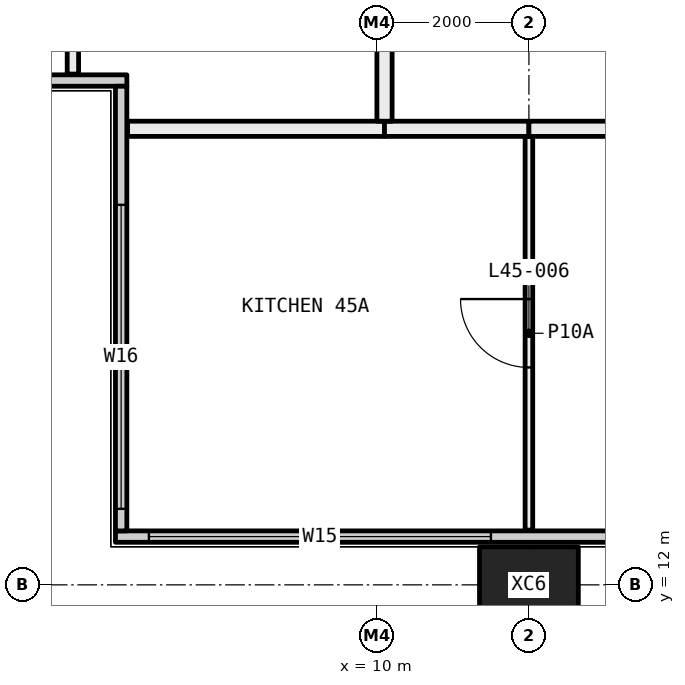
"""IFC4 building model, lengths in metres.
Left out: names, types, materials, properties, quantities, classifications, styles, units other than length and angle.
Written with IfcOpenShell. Run it as: python <this file> out.ifc"""

import sys

from ifc_helpers import new_model, si_unit, direction, frame, frame_2d, origin, origin_2d, place, context, subcontext, project, spatial, rectangle, hollow_rectangle, extrude, element, fill, save


model = new_model("IFC4")
c1 = context("Model", 3, precision=1e-05, world=origin(), true_north=direction((0.0, 1.0)))
c2 = subcontext(c1, "Body", "Model", "MODEL_VIEW")
j1 = project(units=[si_unit("LENGTHUNIT", "METRE"), si_unit("PLANEANGLEUNIT", "RADIAN")], contexts=[c1])
p1 = place(None, origin())
s1 = spatial("IfcSite", under=j1, at=p1, CompositionType="ELEMENT")
p2 = place(p1, origin())
s2 = spatial("IfcBuilding", under=s1, at=p2, CompositionType="ELEMENT")
p3 = place(p2, frame((0.0, 0.0, 172.05)))
s3 = spatial("IfcBuildingStorey", under=s2, at=p3, CompositionType="ELEMENT", Elevation=172.05)
p4 = place(p3, frame((12.0, 12.0, -0.4), z_axis=(0.0, 0.0, 1.0), x_axis=(1.0, 0.0, 0.0)))
e1 = element("IfcColumn", 1, at=p4, inside=s3, PredefinedType="COLUMN", context=c2, shape_type="SweptSolid", body=[
    extrude(hollow_rectangle(XDim=1.3, YDim=1.0, WallThickness=0.05, at=origin_2d()), origin(), (0.0, 0.0, 1.0), 3.45),
])
p5 = place(p3, frame((6.56, 12.635, 0.0), z_axis=(0.0, 0.0, 1.0), x_axis=(1.0, 0.0, 0.0)))
e2 = element("IfcWall", 2, at=p5, inside=s3, PredefinedType="ELEMENTEDWALL", context=c2, shape_type="SweptSolid", body=[
    extrude(rectangle(XDim=46.88, YDim=0.15, at=frame_2d((23.44, 0.0))), origin(), (0.0, 0.0, 1.0), 3.05),
])
p6 = place(p5, frame((0.44, 0.0, 0.45)))
e3 = element("IfcOpeningElement", 3, at=p6, cuts=e2, PredefinedType="OPENING", context=c2, shape_type="SweptSolid", body=[
    extrude(rectangle(XDim=4.5, YDim=2.55, at=frame_2d((2.25, 1.275))), frame((0.0, 0.085, 0.0), z_axis=(0.0, -1.0, 0.0), x_axis=(1.0, 0.0, 0.0)), (0.0, 0.0, 1.0), 0.17),
])
p7 = place(p5, frame((7.69, 0.0, 0.45)))
e4 = element("IfcOpeningElement", 4, at=p7, cuts=e2, PredefinedType="OPENING", context=c2, shape_type="SweptSolid", body=[
    extrude(rectangle(XDim=3.25, YDim=2.55, at=frame_2d((1.625, 1.275))), frame((0.0, 0.085, 0.0), z_axis=(0.0, -1.0, 0.0), x_axis=(1.0, 0.0, 0.0)), (0.0, 0.0, 1.0), 0.17),
])
p8 = place(p5, frame((11.94, 0.0, 0.45)))
e5 = element("IfcOpeningElement", 5, at=p8, cuts=e2, PredefinedType="OPENING", context=c2, shape_type="SweptSolid", body=[
    extrude(rectangle(XDim=3.25, YDim=2.55, at=frame_2d((1.625, 1.275))), frame((0.0, 0.085, 0.0), z_axis=(0.0, -1.0, 0.0), x_axis=(1.0, 0.0, 0.0)), (0.0, 0.0, 1.0), 0.17),
])
p9 = place(p5, frame((19.69, 0.0, 0.45)))
e6 = element("IfcOpeningElement", 6, at=p9, cuts=e2, PredefinedType="OPENING", context=c2, shape_type="SweptSolid", body=[
    extrude(rectangle(XDim=3.25, YDim=2.55, at=frame_2d((1.625, 1.275))), frame((0.0, 0.085, 0.0), z_axis=(0.0, -1.0, 0.0), x_axis=(1.0, 0.0, 0.0)), (0.0, 0.0, 1.0), 0.17),
])
p10 = place(p5, frame((23.94, 0.0, 0.45)))
e7 = element("IfcOpeningElement", 7, at=p10, cuts=e2, PredefinedType="OPENING", context=c2, shape_type="SweptSolid", body=[
    extrude(rectangle(XDim=2.0, YDim=2.55, at=frame_2d((1.0, 1.275))), frame((0.0, 0.085, 0.0), z_axis=(0.0, -1.0, 0.0), x_axis=(1.0, 0.0, 0.0)), (0.0, 0.0, 1.0), 0.17),
])
p11 = place(p5, frame((31.69, 0.0, 0.45)))
e8 = element("IfcOpeningElement", 8, at=p11, cuts=e2, PredefinedType="OPENING", context=c2, shape_type="SweptSolid", body=[
    extrude(rectangle(XDim=3.25, YDim=2.55, at=frame_2d((1.625, 1.275))), frame((0.0, 0.085, 0.0), z_axis=(0.0, -1.0, 0.0), x_axis=(1.0, 0.0, 0.0)), (0.0, 0.0, 1.0), 0.17),
])
p12 = place(p5, frame((35.94, 0.0, 0.45)))
e9 = element("IfcOpeningElement", 9, at=p12, cuts=e2, PredefinedType="OPENING", context=c2, shape_type="SweptSolid", body=[
    extrude(rectangle(XDim=3.25, YDim=2.55, at=frame_2d((1.625, 1.275))), frame((0.0, 0.085, 0.0), z_axis=(0.0, -1.0, 0.0), x_axis=(1.0, 0.0, 0.0)), (0.0, 0.0, 1.0), 0.17),
])
p13 = place(p5, frame((41.94, 0.0, 0.45)))
e10 = element("IfcOpeningElement", 10, at=p13, cuts=e2, PredefinedType="OPENING", context=c2, shape_type="SweptSolid", body=[
    extrude(rectangle(XDim=4.5, YDim=2.55, at=frame_2d((2.25, 1.275))), frame((0.0, 0.085, 0.0), z_axis=(0.0, -1.0, 0.0), x_axis=(1.0, 0.0, 0.0)), (0.0, 0.0, 1.0), 0.17),
])
p14 = place(p3, frame((0.56, 18.635, 0.0), z_axis=(0.0, 0.0, 1.0), x_axis=(1.0, 0.0, 0.0)))
e11 = element("IfcWall", 11, at=p14, inside=s3, PredefinedType="ELEMENTEDWALL", context=c2, shape_type="SweptSolid", body=[
    extrude(rectangle(XDim=6.15, YDim=0.15, at=frame_2d((3.075, 0.0))), origin(), (0.0, 0.0, 1.0), 3.05),
])
p15 = place(p14, frame((0.44, 0.0, 0.45)))
e12 = element("IfcOpeningElement", 12, at=p15, cuts=e11, PredefinedType="OPENING", context=c2, shape_type="SweptSolid", body=[
    extrude(rectangle(XDim=4.0, YDim=2.55, at=frame_2d((2.0, 1.275))), frame((0.0, 0.085, 0.0), z_axis=(0.0, -1.0, 0.0), x_axis=(1.0, 0.0, 0.0)), (0.0, 0.0, 1.0), 0.17),
])
p16 = place(p3, frame((6.635, 12.71, 0.0), z_axis=(0.0, 0.0, 1.0), x_axis=(0.0, 1.0, 0.0)))
e13 = element("IfcWall", 13, at=p16, inside=s3, PredefinedType="ELEMENTEDWALL", context=c2, shape_type="SweptSolid", body=[
    extrude(rectangle(XDim=5.85, YDim=0.15, at=frame_2d((2.925, 0.0))), origin(), (0.0, 0.0, 1.0), 3.05),
])
p17 = place(p16, frame((0.29, 0.0, 0.45)))
e14 = element("IfcOpeningElement", 14, at=p17, cuts=e13, PredefinedType="OPENING", context=c2, shape_type="SweptSolid", body=[
    extrude(rectangle(XDim=4.0, YDim=2.55, at=frame_2d((2.0, 1.275))), frame((0.0, 0.085, 0.0), z_axis=(0.0, -1.0, 0.0), x_axis=(1.0, 0.0, 0.0)), (0.0, 0.0, 1.0), 0.17),
])
p18 = place(p3, frame((12.0, 12.72, 0.0), z_axis=(0.0, 0.0, 1.0), x_axis=(0.0, 1.0, 0.0)))
e15 = element("IfcWall", 15, at=p18, inside=s3, PredefinedType="PARTITIONING", context=c2, shape_type="SweptSolid", body=[
    extrude(rectangle(XDim=5.18, YDim=0.1, at=frame_2d((2.59, 0.0))), origin(), (0.0, 0.0, 1.0), 3.05),
])
p19 = place(p18, frame((2.14, 0.0, 0.0)))
e16 = element("IfcOpeningElement", 16, at=p19, cuts=e15, PredefinedType="OPENING", context=c2, shape_type="SweptSolid", body=[
    extrude(rectangle(XDim=0.9, YDim=2.1, at=frame_2d((0.45, 1.05))), frame((0.0, 0.06, 0.0), z_axis=(0.0, -1.0, 0.0), x_axis=(1.0, 0.0, 0.0)), (0.0, 0.0, 1.0), 0.12),
])
p20 = place(p3, frame((10.1, 18.0, 0.0), z_axis=(0.0, 0.0, 1.0), x_axis=(-1.0, 0.0, 0.0)))
e17 = element("IfcWall", 17, at=p20, inside=s3, PredefinedType="PARTITIONING", context=c2, shape_type="SweptSolid", body=[
    extrude(rectangle(XDim=3.38, YDim=0.2, at=frame_2d((1.69, 0.0))), origin(), (0.0, 0.0, 1.0), 3.05),
])
p21 = place(p3, frame((12.0, 18.0, 0.0), z_axis=(0.0, 0.0, 1.0), x_axis=(-1.0, 0.0, 0.0)))
e18 = element("IfcWall", 18, at=p21, inside=s3, PredefinedType="PARTITIONING", context=c2, shape_type="SweptSolid", body=[
    extrude(rectangle(XDim=1.9, YDim=0.2, at=frame_2d((0.95, 0.0))), origin(), (0.0, 0.0, 1.0), 3.05),
])
p22 = place(p3, frame((18.0, 18.0, 0.0), z_axis=(0.0, 0.0, 1.0), x_axis=(-1.0, 0.0, 0.0)))
e19 = element("IfcWall", 19, at=p22, inside=s3, PredefinedType="PARTITIONING", context=c2, shape_type="SweptSolid", body=[
    extrude(rectangle(XDim=6.0, YDim=0.2, at=frame_2d((3.0, 0.0))), origin(), (0.0, 0.0, 1.0), 3.05),
])
p23 = place(p3, frame((6.0, 18.72, 0.0), z_axis=(0.0, 0.0, 1.0), x_axis=(0.0, 1.0, 0.0)))
e20 = element("IfcWall", 20, at=p23, inside=s3, PredefinedType="PARTITIONING", context=c2, shape_type="SweptSolid", body=[
    extrude(rectangle(XDim=3.78, YDim=0.15, at=frame_2d((1.89, 0.0))), origin(), (0.0, 0.0, 1.0), 3.05),
])
p24 = place(p3, frame((10.1, 18.1, 0.0), z_axis=(0.0, 0.0, 1.0), x_axis=(0.0, 1.0, 0.0)))
e21 = element("IfcWall", 21, at=p24, inside=s3, PredefinedType="PARTITIONING", context=c2, shape_type="SweptSolid", body=[
    extrude(rectangle(XDim=4.4, YDim=0.2, at=frame_2d((2.2, 0.0))), origin(), (0.0, 0.0, 1.0), 3.05),
])
p25 = place(p6, origin())
e22 = element("IfcWindow", 22, at=p25, inside=s3, PartitioningType="SINGLE_PANEL", PredefinedType="WINDOW", context=c2, shape_type="SweptSolid", body=[
    extrude(rectangle(XDim=4.5, YDim=2.55, at=frame_2d((2.25, 1.275))), frame((0.0, 0.03, 0.0), z_axis=(0.0, -1.0, 0.0), x_axis=(1.0, 0.0, 0.0)), (0.0, 0.0, 1.0), 0.06),
])
fill(e3, e22)
p26 = place(p17, origin())
e23 = element("IfcWindow", 23, at=p26, inside=s3, PartitioningType="SINGLE_PANEL", PredefinedType="WINDOW", context=c2, shape_type="SweptSolid", body=[
    extrude(rectangle(XDim=4.0, YDim=2.55, at=frame_2d((2.0, 1.275))), frame((0.0, 0.03, 0.0), z_axis=(0.0, -1.0, 0.0), x_axis=(1.0, 0.0, 0.0)), (0.0, 0.0, 1.0), 0.06),
])
fill(e14, e23)
p27 = place(p19, origin())
e24 = element("IfcDoor", 24, at=p27, inside=s3, OperationType="SINGLE_SWING_LEFT", PredefinedType="DOOR", context=c2, shape_type="SweptSolid", body=[
    extrude(rectangle(XDim=0.9, YDim=2.1, at=frame_2d((0.45, 1.05))), frame((0.0, 0.025, 0.0), z_axis=(0.0, -1.0, 0.0), x_axis=(1.0, 0.0, 0.0)), (0.0, 0.0, 1.0), 0.05),
])
fill(e16, e24)
save(model, sys.argv[1])
